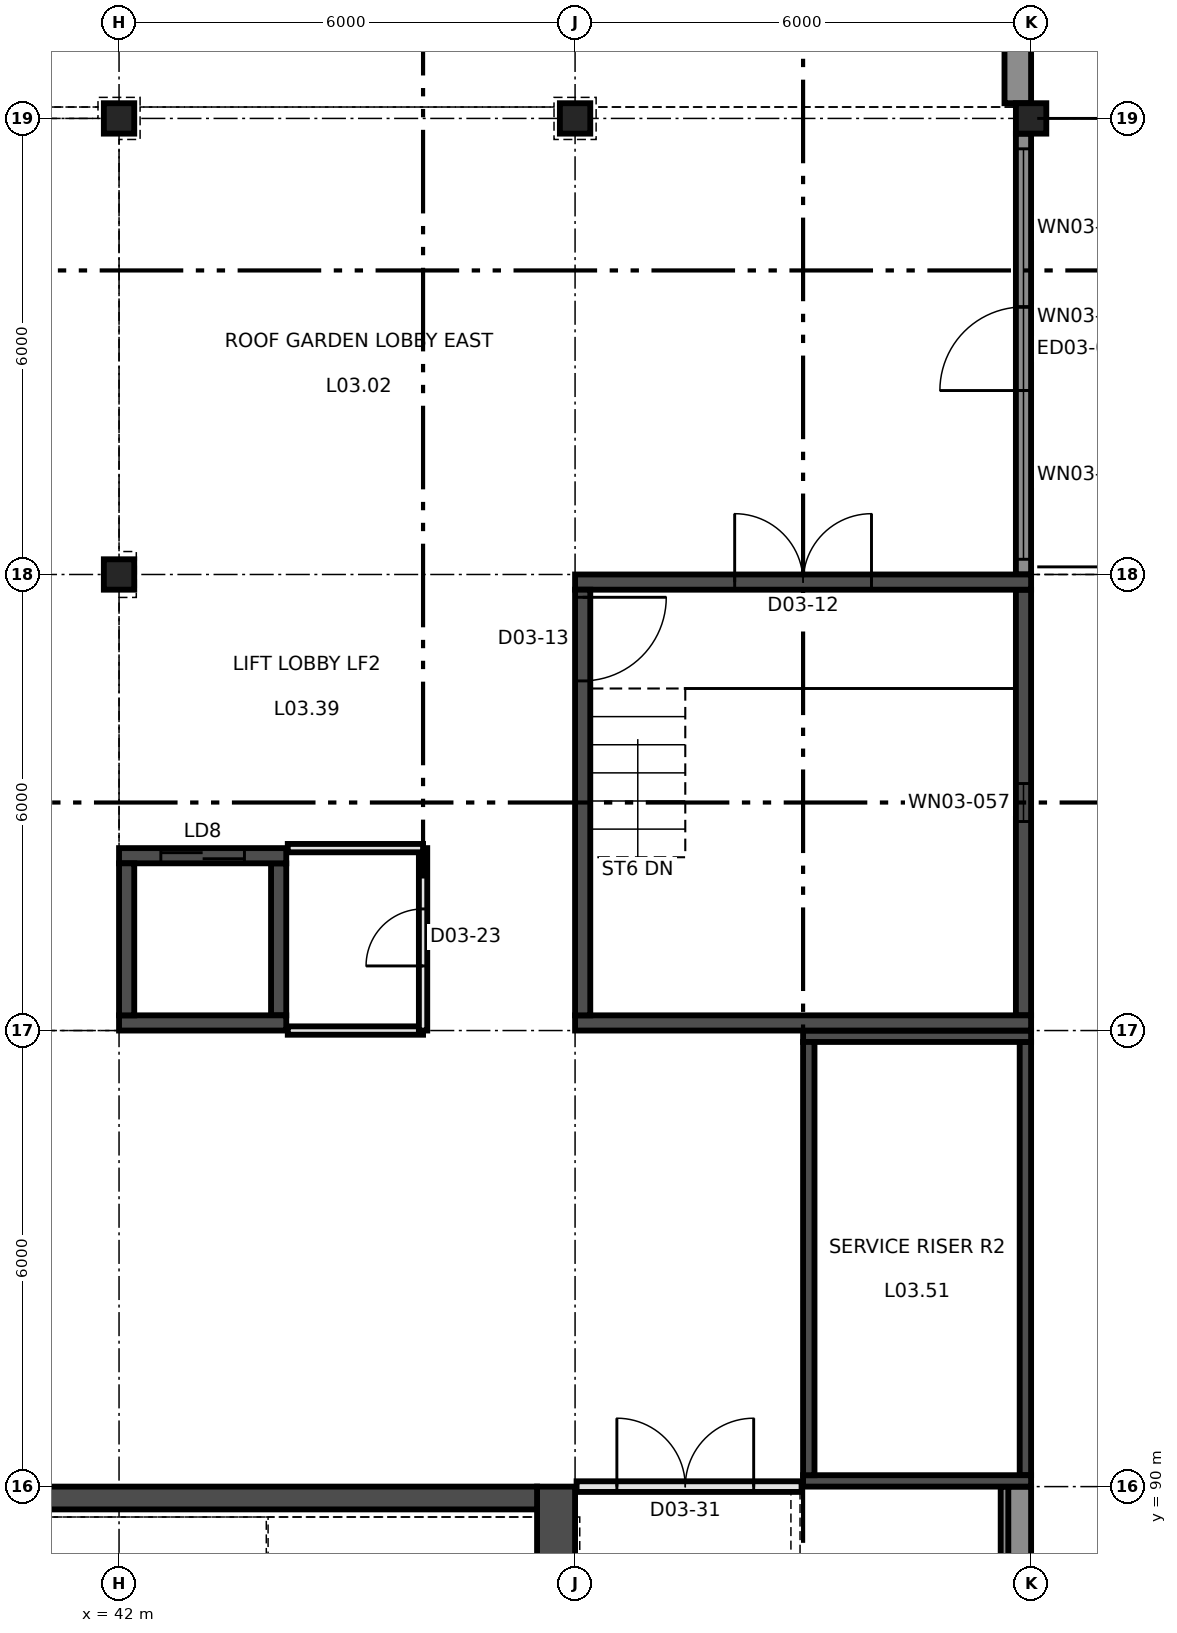
"""IFC4 building model, lengths in metres.
Left out: names, types, materials, properties, quantities, classifications, styles, units other than length and angle.
Written with IfcOpenShell. Run it as: python <this file> out.ifc"""

import sys

from ifc_helpers import new_model, si_unit, direction, frame, frame_2d, origin, origin_2d, place, context, subcontext, project, spatial, rectangle, extrude, element, fill, save


model = new_model("IFC4")
c1 = context("Model", 3, precision=1e-05, world=origin(), true_north=direction((0.0, 1.0)))
c2 = subcontext(c1, "Body", "Model", "MODEL_VIEW")
j1 = project(units=[si_unit("LENGTHUNIT", "METRE"), si_unit("PLANEANGLEUNIT", "RADIAN")], contexts=[c1])
p1 = place(None, origin())
s1 = spatial("IfcSite", under=j1, at=p1, CompositionType="ELEMENT")
p2 = place(p1, origin())
s2 = spatial("IfcBuilding", under=s1, at=p2, CompositionType="ELEMENT")
p3 = place(p2, frame((0.0, 0.0, 16.5)))
s3 = spatial("IfcBuildingStorey", under=s2, at=p3, CompositionType="ELEMENT", Elevation=16.5)
for number, where, z_axis, x_axis in (
    (1, (42.0, 102.0, 0.0), (0.0, 0.0, 1.0), (1.0, 0.0, 0.0)),
    (2, (42.0, 108.0, 0.0), (0.0, 0.0, 1.0), (1.0, 0.0, 0.0)),
    (3, (48.0, 108.0, 0.0), (0.0, 0.0, 1.0), (1.0, 0.0, 0.0)),
    (4, (54.0, 108.0, 0.0), (0.0, 0.0, 1.0), (1.0, 0.0, 0.0)),
):
    element("IfcColumn", number, at=place(p3, frame(where, z_axis=z_axis, x_axis=x_axis)), inside=s3, PredefinedType="COLUMN", context=c2, shape_type="SweptSolid", body=[
        extrude(rectangle(XDim=0.4, YDim=0.4, at=origin_2d()), origin(), (0.0, 0.0, 1.0), 11.5),
    ])
p4 = place(p3, frame((48.0, 101.9, 0.0), z_axis=(0.0, 0.0, 1.0), x_axis=(1.0, 0.0, 0.0)))
e5 = element("IfcWall", 5, at=p4, inside=s3, PredefinedType="SHEAR", context=c2, shape_type="SweptSolid", body=[
    extrude(rectangle(XDim=6.0, YDim=0.2, at=frame_2d((3.0, 0.0))), origin(), (0.0, 0.0, 1.0), 11.5),
])
p5 = place(p4, frame((2.1, 0.0, 0.0)))
e6 = element("IfcOpeningElement", 6, at=p5, cuts=e5, PredefinedType="OPENING", context=c2, shape_type="SweptSolid", body=[
    extrude(rectangle(XDim=1.8, YDim=2.2, at=frame_2d((0.9, 1.1))), frame((0.0, 0.11, 0.0), z_axis=(0.0, -1.0, 0.0), x_axis=(1.0, 0.0, 0.0)), (0.0, 0.0, 1.0), 0.22),
])
p6 = place(p3, frame((48.0, 96.1, 0.0), z_axis=(0.0, 0.0, 1.0), x_axis=(1.0, 0.0, 0.0)))
e7 = element("IfcWall", 7, at=p6, inside=s3, PredefinedType="SHEAR", context=c2, shape_type="SweptSolid", body=[
    extrude(rectangle(XDim=6.0, YDim=0.2, at=frame_2d((3.0, 0.0))), origin(), (0.0, 0.0, 1.0), 11.5),
])
p7 = place(p3, frame((48.1, 96.2, 0.0), z_axis=(0.0, 0.0, 1.0), x_axis=(0.0, 1.0, 0.0)))
e8 = element("IfcWall", 8, at=p7, inside=s3, PredefinedType="SHEAR", context=c2, shape_type="SweptSolid", body=[
    extrude(rectangle(XDim=5.6, YDim=0.2, at=frame_2d((2.8, 0.0))), origin(), (0.0, 0.0, 1.0), 11.5),
])
p8 = place(p7, frame((4.4, 0.0, 0.0)))
e9 = element("IfcOpeningElement", 9, at=p8, cuts=e8, PredefinedType="OPENING", context=c2, shape_type="SweptSolid", body=[
    extrude(rectangle(XDim=1.1, YDim=2.2, at=frame_2d((0.55, 1.1))), frame((0.0, 0.11, 0.0), z_axis=(0.0, -1.0, 0.0), x_axis=(1.0, 0.0, 0.0)), (0.0, 0.0, 1.0), 0.22),
])
p9 = place(p3, frame((53.9, 96.2, 0.0), z_axis=(0.0, 0.0, 1.0), x_axis=(0.0, 1.0, 0.0)))
e10 = element("IfcWall", 10, at=p9, inside=s3, PredefinedType="SHEAR", context=c2, shape_type="SweptSolid", body=[
    extrude(rectangle(XDim=5.6, YDim=0.2, at=frame_2d((2.8, 0.0))), origin(), (0.0, 0.0, 1.0), 11.5),
])
p10 = place(p9, frame((2.55, 0.0, 0.9)))
e11 = element("IfcOpeningElement", 11, at=p10, cuts=e10, PredefinedType="OPENING", context=c2, shape_type="SweptSolid", body=[
    extrude(rectangle(XDim=0.5, YDim=2.1, at=frame_2d((0.25, 1.05))), frame((0.0, 0.11, 0.0), z_axis=(0.0, -1.0, 0.0), x_axis=(1.0, 0.0, 0.0)), (0.0, 0.0, 1.0), 0.22),
])
p11 = place(p3, frame((42.0, 98.3, 0.0), z_axis=(0.0, 0.0, 1.0), x_axis=(1.0, 0.0, 0.0)))
e12 = element("IfcWall", 12, at=p11, inside=s3, PredefinedType="SHEAR", context=c2, shape_type="SweptSolid", body=[
    extrude(rectangle(XDim=2.2, YDim=0.2, at=frame_2d((1.1, 0.0))), origin(), (0.0, 0.0, 1.0), 11.5),
])
p12 = place(p11, frame((0.55, 0.0, 0.0)))
e13 = element("IfcOpeningElement", 13, at=p12, cuts=e12, PredefinedType="OPENING", context=c2, shape_type="SweptSolid", body=[
    extrude(rectangle(XDim=1.1, YDim=2.1, at=frame_2d((0.55, 1.05))), frame((0.0, 0.11, 0.0), z_axis=(0.0, -1.0, 0.0), x_axis=(1.0, 0.0, 0.0)), (0.0, 0.0, 1.0), 0.22),
])
p13 = place(p3, frame((42.0, 96.1, 0.0), z_axis=(0.0, 0.0, 1.0), x_axis=(1.0, 0.0, 0.0)))
e14 = element("IfcWall", 14, at=p13, inside=s3, PredefinedType="SHEAR", context=c2, shape_type="SweptSolid", body=[
    extrude(rectangle(XDim=2.2, YDim=0.2, at=frame_2d((1.1, 0.0))), origin(), (0.0, 0.0, 1.0), 11.5),
])
for number, where, z_axis, x_axis in (
    (15, (42.1, 96.2, 0.0), (0.0, 0.0, 1.0), (0.0, 1.0, 0.0)),
    (16, (44.1, 96.2, 0.0), (0.0, 0.0, 1.0), (0.0, 1.0, 0.0)),
):
    element("IfcWall", number, at=place(p3, frame(where, z_axis=z_axis, x_axis=x_axis)), inside=s3, PredefinedType="SHEAR", context=c2, shape_type="SweptSolid", body=[
        extrude(rectangle(XDim=2.0, YDim=0.2, at=frame_2d((1.0, 0.0))), origin(), (0.0, 0.0, 1.0), 11.5),
    ])
for number, where, z_axis, x_axis in (
    (17, (51.0, 95.925, 0.0), (0.0, 0.0, 1.0), (1.0, 0.0, 0.0)),
    (18, (51.0, 90.075, 0.0), (0.0, 0.0, 1.0), (1.0, 0.0, 0.0)),
):
    element("IfcWall", number, at=place(p3, frame(where, z_axis=z_axis, x_axis=x_axis)), inside=s3, PredefinedType="SHEAR", context=c2, shape_type="SweptSolid", body=[
        extrude(rectangle(XDim=3.0, YDim=0.15, at=frame_2d((1.5, 0.0))), origin(), (0.0, 0.0, 1.0), 11.5),
    ])
for number, where, z_axis, x_axis in (
    (19, (51.075, 90.15, 0.0), (0.0, 0.0, 1.0), (0.0, 1.0, 0.0)),
    (20, (53.925, 90.15, 0.0), (0.0, 0.0, 1.0), (0.0, 1.0, 0.0)),
):
    element("IfcWall", number, at=place(p3, frame(where, z_axis=z_axis, x_axis=x_axis)), inside=s3, PredefinedType="SHEAR", context=c2, shape_type="SweptSolid", body=[
        extrude(rectangle(XDim=5.7, YDim=0.15, at=frame_2d((2.85, 0.0))), origin(), (0.0, 0.0, 1.0), 11.5),
    ])
p14 = place(p3, frame((47.75, 54.5, 0.0), z_axis=(0.0, 0.0, 1.0), x_axis=(0.0, 1.0, 0.0)))
e21 = element("IfcWall", 21, at=p14, inside=s3, PredefinedType="SHEAR", context=c2, shape_type="SweptSolid", body=[
    extrude(rectangle(XDim=35.5, YDim=0.5, at=frame_2d((17.75, 0.0))), origin(), (0.0, 0.0, 1.0), 3.9),
])
p15 = place(p14, frame((29.35, 0.0, 0.0)))
e22 = element("IfcOpeningElement", 22, at=p15, cuts=e21, PredefinedType="OPENING", context=c2, shape_type="SweptSolid", body=[
    extrude(rectangle(XDim=1.3, YDim=2.1, at=frame_2d((0.65, 1.05))), frame((0.0, 0.26, 0.0), z_axis=(0.0, -1.0, 0.0), x_axis=(1.0, 0.0, 0.0)), (0.0, 0.0, 1.0), 0.52),
])
p16 = place(p14, frame((2.6, 0.0, 0.0)))
e23 = element("IfcOpeningElement", 23, at=p16, cuts=e21, PredefinedType="OPENING", context=c2, shape_type="SweptSolid", body=[
    extrude(rectangle(XDim=1.0, YDim=2.1, at=frame_2d((0.5, 1.05))), frame((0.0, 0.26, 0.0), z_axis=(0.0, -1.0, 0.0), x_axis=(1.0, 0.0, 0.0)), (0.0, 0.0, 1.0), 0.52),
])
p17 = place(p3, frame((18.5, 89.85, 0.0), z_axis=(0.0, 0.0, 1.0), x_axis=(1.0, 0.0, 0.0)))
e24 = element("IfcWall", 24, at=p17, inside=s3, PredefinedType="SHEAR", context=c2, shape_type="SweptSolid", body=[
    extrude(rectangle(XDim=29.0, YDim=0.3, at=frame_2d((14.5, 0.0))), origin(), (0.0, 0.0, 1.0), 11.5),
])
p18 = place(p3, frame((53.825, 113.8, 0.0), z_axis=(0.0, 0.0, 1.0), x_axis=(0.0, -1.0, 0.0)))
e25 = element("IfcWall", 25, at=p18, inside=s3, PredefinedType="SOLIDWALL", context=c2, shape_type="SweptSolid", body=[
    extrude(rectangle(XDim=5.6, YDim=0.35, at=frame_2d((2.8, 0.0))), origin(), (0.0, 0.0, 1.0), 10.9),
])
p19 = place(p18, frame((1.25, 0.0, 1.0)))
e26 = element("IfcOpeningElement", 26, at=p19, cuts=e25, PredefinedType="OPENING", context=c2, shape_type="SweptSolid", body=[
    extrude(rectangle(XDim=1.1, YDim=4.4, at=frame_2d((0.55, 2.2))), frame((0.0, 0.185, 0.0), z_axis=(0.0, -1.0, 0.0), x_axis=(1.0, 0.0, 0.0)), (0.0, 0.0, 1.0), 0.37),
])
p20 = place(p18, frame((3.25, 0.0, 1.0)))
e27 = element("IfcOpeningElement", 27, at=p20, cuts=e25, PredefinedType="OPENING", context=c2, shape_type="SweptSolid", body=[
    extrude(rectangle(XDim=1.1, YDim=4.4, at=frame_2d((0.55, 2.2))), frame((0.0, 0.185, 0.0), z_axis=(0.0, -1.0, 0.0), x_axis=(1.0, 0.0, 0.0)), (0.0, 0.0, 1.0), 0.37),
])
p21 = place(p18, frame((1.25, 0.0, 6.6)))
e28 = element("IfcOpeningElement", 28, at=p21, cuts=e25, PredefinedType="OPENING", context=c2, shape_type="SweptSolid", body=[
    extrude(rectangle(XDim=1.1, YDim=2.1, at=frame_2d((0.55, 1.05))), frame((0.0, 0.185, 0.0), z_axis=(0.0, -1.0, 0.0), x_axis=(1.0, 0.0, 0.0)), (0.0, 0.0, 1.0), 0.37),
])
p22 = place(p18, frame((3.25, 0.0, 6.6)))
e29 = element("IfcOpeningElement", 29, at=p22, cuts=e25, PredefinedType="OPENING", context=c2, shape_type="SweptSolid", body=[
    extrude(rectangle(XDim=1.1, YDim=2.1, at=frame_2d((0.55, 1.05))), frame((0.0, 0.185, 0.0), z_axis=(0.0, -1.0, 0.0), x_axis=(1.0, 0.0, 0.0)), (0.0, 0.0, 1.0), 0.37),
])
p23 = place(p3, frame((53.9, 107.8, 0.0), z_axis=(0.0, 0.0, 1.0), x_axis=(0.0, -1.0, 0.0)))
e30 = element("IfcWall", 30, at=p23, inside=s3, PredefinedType="SOLIDWALL", context=c2, shape_type="SweptSolid", body=[
    extrude(rectangle(XDim=5.8, YDim=0.2, at=frame_2d((2.9, 0.0))), origin(), (0.0, 0.0, 1.0), 10.9),
])
p24 = place(p23, frame((2.28, 0.0, 0.0)))
e31 = element("IfcOpeningElement", 31, at=p24, cuts=e30, PredefinedType="OPENING", context=c2, shape_type="SweptSolid", body=[
    extrude(rectangle(XDim=1.1, YDim=2.4, at=frame_2d((0.55, 1.2))), frame((0.0, 0.11, 0.0), z_axis=(0.0, -1.0, 0.0), x_axis=(1.0, 0.0, 0.0)), (0.0, 0.0, 1.0), 0.22),
])
p25 = place(p23, frame((2.28, 0.0, 2.5)))
e32 = element("IfcOpeningElement", 32, at=p25, cuts=e30, PredefinedType="OPENING", context=c2, shape_type="SweptSolid", body=[
    extrude(rectangle(XDim=1.1, YDim=2.9, at=frame_2d((0.55, 1.45))), frame((0.0, 0.11, 0.0), z_axis=(0.0, -1.0, 0.0), x_axis=(1.0, 0.0, 0.0)), (0.0, 0.0, 1.0), 0.22),
])
p26 = place(p23, frame((0.2, 0.0, 0.1)))
e33 = element("IfcOpeningElement", 33, at=p26, cuts=e30, PredefinedType="OPENING", context=c2, shape_type="SweptSolid", body=[
    extrude(rectangle(XDim=2.08, YDim=5.3, at=frame_2d((1.04, 2.65))), frame((0.0, 0.11, 0.0), z_axis=(0.0, -1.0, 0.0), x_axis=(1.0, 0.0, 0.0)), (0.0, 0.0, 1.0), 0.22),
])
p27 = place(p23, frame((3.38, 0.0, 0.1)))
e34 = element("IfcOpeningElement", 34, at=p27, cuts=e30, PredefinedType="OPENING", context=c2, shape_type="SweptSolid", body=[
    extrude(rectangle(XDim=2.22, YDim=5.3, at=frame_2d((1.11, 2.65))), frame((0.0, 0.11, 0.0), z_axis=(0.0, -1.0, 0.0), x_axis=(1.0, 0.0, 0.0)), (0.0, 0.0, 1.0), 0.22),
])
p28 = place(p3, frame((53.775, 90.0, 0.0), z_axis=(0.0, 0.0, 1.0), x_axis=(0.0, -1.0, 0.0)))
e35 = element("IfcWall", 35, at=p28, inside=s3, PredefinedType="SOLIDWALL", context=c2, shape_type="SweptSolid", body=[
    extrude(rectangle(XDim=5.8, YDim=0.35, at=frame_2d((2.9, 0.0))), origin(), (0.0, 0.0, 1.0), 3.9),
])
p29 = place(p3, frame((53.85, 30.0, 4.5), z_axis=(0.0, 0.0, 1.0), x_axis=(0.0, 1.0, 0.0)))
e36 = element("IfcWall", 36, at=p29, inside=s3, PredefinedType="PARAPET", context=c2, shape_type="SweptSolid", body=[
    extrude(rectangle(XDim=60.0, YDim=0.3, at=frame_2d((30.0, 0.0))), origin(), (0.0, 0.0, 1.0), 1.2),
])
p30 = place(p3, frame((44.22, 96.0, 0.0), z_axis=(0.0, 0.0, 1.0), x_axis=(1.0, 0.0, 0.0)))
e37 = element("IfcWall", 37, at=p30, inside=s3, PredefinedType="PARTITIONING", context=c2, shape_type="SweptSolid", body=[
    extrude(rectangle(XDim=1.78, YDim=0.11, at=frame_2d((0.89, 0.0))), origin(), (0.0, 0.0, 1.0), 6.28),
])
p31 = place(p3, frame((46.0, 96.0, 0.0), z_axis=(0.0, 0.0, 1.0), x_axis=(0.0, 1.0, 0.0)))
e38 = element("IfcWall", 38, at=p31, inside=s3, PredefinedType="PARTITIONING", context=c2, shape_type="SweptSolid", body=[
    extrude(rectangle(XDim=2.4, YDim=0.11, at=frame_2d((1.2, 0.0))), origin(), (0.0, 0.0, 1.0), 6.28),
])
p32 = place(p31, frame((0.85, 0.0, 0.0)))
e39 = element("IfcOpeningElement", 39, at=p32, cuts=e38, PredefinedType="OPENING", context=c2, shape_type="SweptSolid", body=[
    extrude(rectangle(XDim=0.75, YDim=2.04, at=frame_2d((0.375, 1.02))), frame((0.0, 0.065, 0.0), z_axis=(0.0, -1.0, 0.0), x_axis=(1.0, 0.0, 0.0)), (0.0, 0.0, 1.0), 0.13),
])
p33 = place(p3, frame((44.22, 98.4, 0.0), z_axis=(0.0, 0.0, 1.0), x_axis=(1.0, 0.0, 0.0)))
e40 = element("IfcWall", 40, at=p33, inside=s3, PredefinedType="PARTITIONING", context=c2, shape_type="SweptSolid", body=[
    extrude(rectangle(XDim=1.78, YDim=0.11, at=frame_2d((0.89, 0.0))), origin(), (0.0, 0.0, 1.0), 6.28),
])
p34 = place(p3, frame((48.02, 90.0, 0.0), z_axis=(0.0, 0.0, 1.0), x_axis=(1.0, 0.0, 0.0)))
e41 = element("IfcWall", 41, at=p34, inside=s3, PredefinedType="PARTITIONING", context=c2, shape_type="SweptSolid", body=[
    extrude(rectangle(XDim=2.96, YDim=0.14, at=frame_2d((1.48, 0.0))), origin(), (0.0, 0.0, 1.0), 3.9),
])
p35 = place(p34, frame((0.53, 0.0, 0.0)))
e42 = element("IfcOpeningElement", 42, at=p35, cuts=e41, PredefinedType="OPENING", context=c2, shape_type="SweptSolid", body=[
    extrude(rectangle(XDim=1.8, YDim=2.1, at=frame_2d((0.9, 1.05))), frame((0.0, 0.08, 0.0), z_axis=(0.0, -1.0, 0.0), x_axis=(1.0, 0.0, 0.0)), (0.0, 0.0, 1.0), 0.16),
])
p36 = place(p24, origin())
e43 = element("IfcDoor", 43, at=p36, inside=s3, OperationType="SINGLE_SWING_RIGHT", PredefinedType="DOOR", context=c2, shape_type="SweptSolid", body=[
    extrude(rectangle(XDim=1.1, YDim=2.4, at=frame_2d((0.55, 1.2))), frame((0.0, 0.025, 0.0), z_axis=(0.0, -1.0, 0.0), x_axis=(1.0, 0.0, 0.0)), (0.0, 0.0, 1.0), 0.05),
])
fill(e31, e43)
p37 = place(p25, origin())
e44 = element("IfcWindow", 44, at=p37, inside=s3, PartitioningType="SINGLE_PANEL", PredefinedType="WINDOW", context=c2, shape_type="SweptSolid", body=[
    extrude(rectangle(XDim=1.1, YDim=2.9, at=frame_2d((0.55, 1.45))), frame((0.0, 0.03, 0.0), z_axis=(0.0, -1.0, 0.0), x_axis=(1.0, 0.0, 0.0)), (0.0, 0.0, 1.0), 0.06),
])
fill(e32, e44)
p38 = place(p26, origin())
e45 = element("IfcWindow", 45, at=p38, inside=s3, PartitioningType="SINGLE_PANEL", PredefinedType="WINDOW", context=c2, shape_type="SweptSolid", body=[
    extrude(rectangle(XDim=2.08, YDim=5.3, at=frame_2d((1.04, 2.65))), frame((0.0, 0.03, 0.0), z_axis=(0.0, -1.0, 0.0), x_axis=(1.0, 0.0, 0.0)), (0.0, 0.0, 1.0), 0.06),
])
fill(e33, e45)
p39 = place(p27, origin())
e46 = element("IfcWindow", 46, at=p39, inside=s3, PartitioningType="SINGLE_PANEL", PredefinedType="WINDOW", context=c2, shape_type="SweptSolid", body=[
    extrude(rectangle(XDim=2.22, YDim=5.3, at=frame_2d((1.11, 2.65))), frame((0.0, 0.03, 0.0), z_axis=(0.0, -1.0, 0.0), x_axis=(1.0, 0.0, 0.0)), (0.0, 0.0, 1.0), 0.06),
])
fill(e34, e46)
p40 = place(p10, origin())
e47 = element("IfcWindow", 47, at=p40, inside=s3, PartitioningType="SINGLE_PANEL", PredefinedType="WINDOW", context=c2, shape_type="SweptSolid", body=[
    extrude(rectangle(XDim=0.5, YDim=2.1, at=frame_2d((0.25, 1.05))), frame((0.0, 0.03, 0.0), z_axis=(0.0, -1.0, 0.0), x_axis=(1.0, 0.0, 0.0)), (0.0, 0.0, 1.0), 0.06),
])
fill(e11, e47)
p41 = place(p5, frame((1.8, 0.0, 0.0), z_axis=(0.0, 0.0, 1.0), x_axis=(-1.0, 0.0, 0.0)))
e48 = element("IfcDoor", 48, at=p41, inside=s3, OperationType="DOUBLE_DOOR_SINGLE_SWING", PredefinedType="DOOR", context=c2, shape_type="SweptSolid", body=[
    extrude(rectangle(XDim=1.8, YDim=2.2, at=frame_2d((0.9, 1.1))), frame((0.0, 0.025, 0.0), z_axis=(0.0, -1.0, 0.0), x_axis=(1.0, 0.0, 0.0)), (0.0, 0.0, 1.0), 0.05),
])
fill(e6, e48)
p42 = place(p8, frame((1.1, 0.0, 0.0), z_axis=(0.0, 0.0, 1.0), x_axis=(-1.0, 0.0, 0.0)))
e49 = element("IfcDoor", 49, at=p42, inside=s3, OperationType="SINGLE_SWING_RIGHT", PredefinedType="DOOR", context=c2, shape_type="SweptSolid", body=[
    extrude(rectangle(XDim=1.1, YDim=2.2, at=frame_2d((0.55, 1.1))), frame((0.0, 0.025, 0.0), z_axis=(0.0, -1.0, 0.0), x_axis=(1.0, 0.0, 0.0)), (0.0, 0.0, 1.0), 0.05),
])
fill(e9, e49)
p43 = place(p32, origin())
e50 = element("IfcDoor", 50, at=p43, inside=s3, OperationType="SINGLE_SWING_LEFT", PredefinedType="DOOR", context=c2, shape_type="SweptSolid", body=[
    extrude(rectangle(XDim=0.75, YDim=2.04, at=frame_2d((0.375, 1.02))), frame((0.0, 0.025, 0.0), z_axis=(0.0, -1.0, 0.0), x_axis=(1.0, 0.0, 0.0)), (0.0, 0.0, 1.0), 0.05),
])
fill(e39, e50)
p44 = place(p35, frame((1.8, 0.0, 0.0), z_axis=(0.0, 0.0, 1.0), x_axis=(-1.0, 0.0, 0.0)))
e51 = element("IfcDoor", 51, at=p44, inside=s3, OperationType="DOUBLE_DOOR_SINGLE_SWING", PredefinedType="DOOR", context=c2, shape_type="SweptSolid", body=[
    extrude(rectangle(XDim=1.8, YDim=2.1, at=frame_2d((0.9, 1.05))), frame((0.0, 0.025, 0.0), z_axis=(0.0, -1.0, 0.0), x_axis=(1.0, 0.0, 0.0)), (0.0, 0.0, 1.0), 0.05),
])
fill(e42, e51)
p45 = place(p12, origin())
e52 = element("IfcDoor", 52, at=p45, inside=s3, OperationType="DOUBLE_DOOR_SLIDING", PredefinedType="DOOR", context=c2, shape_type="SweptSolid", body=[
    extrude(rectangle(XDim=1.1, YDim=2.1, at=frame_2d((0.55, 1.05))), frame((0.0, 0.025, 0.0), z_axis=(0.0, -1.0, 0.0), x_axis=(1.0, 0.0, 0.0)), (0.0, 0.0, 1.0), 0.05),
])
fill(e13, e52)
save(model, sys.argv[1])
